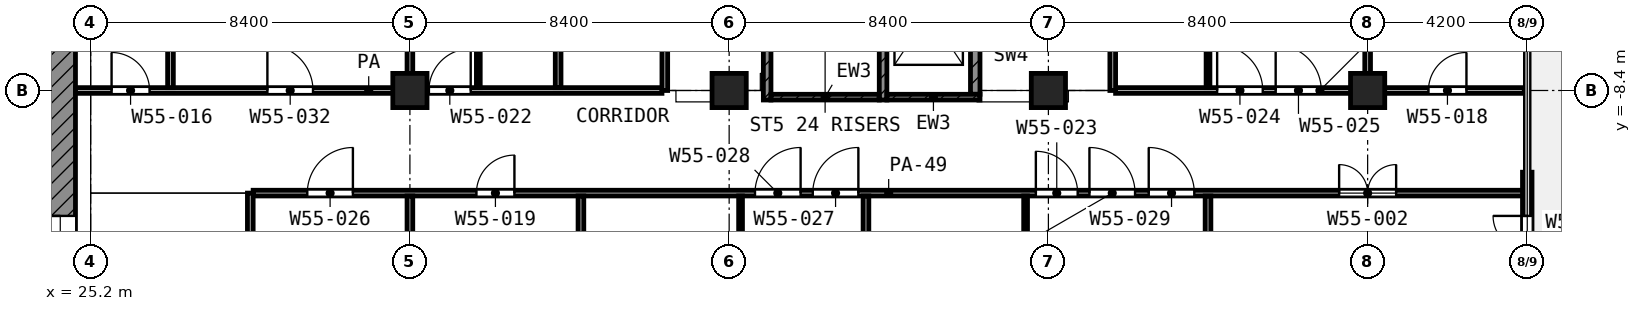
"""IFC4 building model, lengths in metres.
Left out: names, types, materials, properties, quantities, classifications, styles, units other than length and angle.
Written with IfcOpenShell. Run it as: python <this file> out.ifc"""

import sys

from ifc_helpers import new_model, si_unit, direction, frame, frame_2d, origin, origin_2d, place, context, subcontext, project, spatial, rectangle, extrude, element, fill, save


model = new_model("IFC4")
c1 = context("Model", 3, precision=1e-05, world=origin(), true_north=direction((0.0, 1.0)))
c2 = subcontext(c1, "Body", "Model", "MODEL_VIEW")
j1 = project(units=[si_unit("LENGTHUNIT", "METRE"), si_unit("PLANEANGLEUNIT", "RADIAN")], contexts=[c1])
p1 = place(None, origin())
s1 = spatial("IfcSite", under=j1, at=p1, CompositionType="ELEMENT")
p2 = place(p1, origin())
s2 = spatial("IfcBuilding", under=s1, at=p2, CompositionType="ELEMENT")
p3 = place(p2, frame((0.0, 0.0, 260.0)))
s3 = spatial("IfcBuildingStorey", under=s2, at=p3, CompositionType="ELEMENT", Elevation=260.0)
for number, where, z_axis, x_axis in (
    (1, (33.6, -8.4, 0.0), (0.0, 0.0, 1.0), (1.0, 0.0, 0.0)),
    (2, (42.0, -8.4, 0.0), (0.0, 0.0, 1.0), (1.0, 0.0, 0.0)),
    (3, (50.4, -8.4, 0.0), (0.0, 0.0, 1.0), (1.0, 0.0, 0.0)),
    (4, (58.8, -8.4, 0.0), (0.0, 0.0, 1.0), (1.0, 0.0, 0.0)),
):
    element("IfcColumn", number, at=place(p3, frame(where, z_axis=z_axis, x_axis=x_axis)), inside=s3, PredefinedType="COLUMN", context=c2, shape_type="SweptSolid", body=[
        extrude(rectangle(XDim=0.9, YDim=0.9, at=origin_2d()), origin(), (0.0, 0.0, 1.0), 4.2),
    ])
p4 = place(p3, frame((63.0, -14.65, 0.0), z_axis=(0.0, 0.0, 1.0), x_axis=(0.0, 1.0, 0.0)))
e5 = element("IfcWall", 5, at=p4, inside=s3, PredefinedType="SOLIDWALL", context=c2, shape_type="SweptSolid", body=[
    extrude(rectangle(XDim=4.1, YDim=0.25, at=frame_2d((2.05, 0.0))), origin(), (0.0, 0.0, 1.0), 2.58),
])
p5 = place(p4, frame((1.15, 0.0, 0.0)))
e6 = element("IfcOpeningElement", 6, at=p5, cuts=e5, PredefinedType="OPENING", context=c2, shape_type="SweptSolid", body=[
    extrude(rectangle(XDim=1.8, YDim=2.1, at=frame_2d((0.9, 1.05))), frame((0.0, 0.135, 0.0), z_axis=(0.0, -1.0, 0.0), x_axis=(1.0, 0.0, 0.0)), (0.0, 0.0, 1.0), 0.27),
])
p6 = place(p3, frame((24.4, -24.0, 0.0), z_axis=(0.0, 0.0, 1.0), x_axis=(0.0, 1.0, 0.0)))
e7 = element("IfcWall", 7, at=p6, inside=s3, PredefinedType="SHEAR", context=c2, shape_type="SweptSolid", body=[
    extrude(rectangle(XDim=18.6, YDim=0.8, at=frame_2d((9.3, 0.0))), origin(), (0.0, 0.0, 1.0), 3.6),
])
p7 = place(p6, frame((10.5, 0.0, 0.0)))
e8 = element("IfcOpeningElement", 8, at=p7, cuts=e7, PredefinedType="OPENING", context=c2, shape_type="SweptSolid", body=[
    extrude(rectangle(XDim=1.8, YDim=2.1, at=frame_2d((0.9, 1.05))), frame((0.0, 0.41, 0.0), z_axis=(0.0, -1.0, 0.0), x_axis=(1.0, 0.0, 0.0)), (0.0, 0.0, 1.0), 0.82),
])
p8 = place(p3, frame((43.0, -8.65, 0.0), z_axis=(0.0, 0.0, 1.0), x_axis=(0.0, 1.0, 0.0)))
e9 = element("IfcWall", 9, at=p8, inside=s3, PredefinedType="SHEAR", context=c2, shape_type="SweptSolid", body=[
    extrude(rectangle(XDim=8.35, YDim=0.2, at=frame_2d((4.175, 0.0))), origin(), (0.0, 0.0, 1.0), 3.6),
])
p9 = place(p8, frame((7.0, 0.0, 0.0)))
e10 = element("IfcOpeningElement", 10, at=p9, cuts=e9, PredefinedType="OPENING", context=c2, shape_type="SweptSolid", body=[
    extrude(rectangle(XDim=1.1, YDim=2.1, at=frame_2d((0.55, 1.05))), frame((0.0, 0.11, 0.0), z_axis=(0.0, -1.0, 0.0), x_axis=(1.0, 0.0, 0.0)), (0.0, 0.0, 1.0), 0.22),
])
p10 = place(p3, frame((46.05, -8.65, 0.0), z_axis=(0.0, 0.0, 1.0), x_axis=(0.0, 1.0, 0.0)))
e11 = element("IfcWall", 11, at=p10, inside=s3, PredefinedType="SHEAR", context=c2, shape_type="SweptSolid", body=[
    extrude(rectangle(XDim=8.35, YDim=0.2, at=frame_2d((4.175, 0.0))), origin(), (0.0, 0.0, 1.0), 3.6),
])
p11 = place(p10, frame((7.0, 0.0, 0.0)))
e12 = element("IfcOpeningElement", 12, at=p11, cuts=e11, PredefinedType="OPENING", context=c2, shape_type="SweptSolid", body=[
    extrude(rectangle(XDim=1.1, YDim=2.1, at=frame_2d((0.55, 1.05))), frame((0.0, 0.11, 0.0), z_axis=(0.0, -1.0, 0.0), x_axis=(1.0, 0.0, 0.0)), (0.0, 0.0, 1.0), 0.22),
])
p12 = place(p3, frame((43.1, -8.575, 0.0), z_axis=(0.0, 0.0, 1.0), x_axis=(1.0, 0.0, 0.0)))
e13 = element("IfcWall", 13, at=p12, inside=s3, PredefinedType="SHEAR", context=c2, shape_type="SweptSolid", body=[
    extrude(rectangle(XDim=2.85, YDim=0.15, at=frame_2d((1.425, 0.0))), origin(), (0.0, 0.0, 1.0), 3.6),
])
p13 = place(p3, frame((46.15, -8.575, 0.0), z_axis=(0.0, 0.0, 1.0), x_axis=(1.0, 0.0, 0.0)))
e14 = element("IfcWall", 14, at=p13, inside=s3, PredefinedType="SHEAR", context=c2, shape_type="SweptSolid", body=[
    extrude(rectangle(XDim=2.45, YDim=0.15, at=frame_2d((1.225, 0.0))), origin(), (0.0, 0.0, 1.0), 3.6),
])
p14 = place(p3, frame((48.475, -8.5, 0.0), z_axis=(0.0, 0.0, 1.0), x_axis=(0.0, 1.0, 0.0)))
e15 = element("IfcWall", 15, at=p14, inside=s3, PredefinedType="SHEAR", context=c2, shape_type="SweptSolid", body=[
    extrude(rectangle(XDim=3.475, YDim=0.25, at=frame_2d((1.738, 0.0))), origin(), (0.0, 0.0, 1.0), 3.6),
])
p15 = place(p3, frame((35.4, -8.325, 0.0), z_axis=(0.0, 0.0, 1.0), x_axis=(0.0, 1.0, 0.0)))
e16 = element("IfcWall", 16, at=p15, inside=s3, PredefinedType="PARTITIONING", context=c2, shape_type="SweptSolid", body=[
    extrude(rectangle(XDim=3.225, YDim=0.1, at=frame_2d((1.612, 0.0))), origin(), (0.0, 0.0, 1.0), 3.6),
])
p16 = place(p3, frame((42.3, -19.75, 0.0), z_axis=(0.0, 0.0, 1.0), x_axis=(0.0, 1.0, 0.0)))
e17 = element("IfcWall", 17, at=p16, inside=s3, PredefinedType="PARTITIONING", context=c2, shape_type="SweptSolid", body=[
    extrude(rectangle(XDim=8.575, YDim=0.1, at=frame_2d((4.288, 0.0))), origin(), (0.0, 0.0, 1.0), 3.6),
])
p17 = place(p16, frame((3.8, 0.0, 0.0)))
e18 = element("IfcOpeningElement", 18, at=p17, cuts=e17, PredefinedType="OPENING", context=c2, shape_type="SweptSolid", body=[
    extrude(rectangle(XDim=1.0, YDim=2.1, at=frame_2d((0.5, 1.05))), frame((0.0, 0.06, 0.0), z_axis=(0.0, -1.0, 0.0), x_axis=(1.0, 0.0, 0.0)), (0.0, 0.0, 1.0), 0.12),
])
p18 = place(p3, frame((49.8, -20.35, 0.0), z_axis=(0.0, 0.0, 1.0), x_axis=(0.0, 1.0, 0.0)))
e19 = element("IfcWall", 19, at=p18, inside=s3, PredefinedType="PARTITIONING", context=c2, shape_type="SweptSolid", body=[
    extrude(rectangle(XDim=9.175, YDim=0.1, at=frame_2d((4.587, 0.0))), origin(), (0.0, 0.0, 1.0), 3.6),
])
p19 = place(p18, frame((4.1, 0.0, 0.0)))
e20 = element("IfcOpeningElement", 20, at=p19, cuts=e19, PredefinedType="OPENING", context=c2, shape_type="SweptSolid", body=[
    extrude(rectangle(XDim=1.0, YDim=2.1, at=frame_2d((0.5, 1.05))), frame((0.0, 0.06, 0.0), z_axis=(0.0, -1.0, 0.0), x_axis=(1.0, 0.0, 0.0)), (0.0, 0.0, 1.0), 0.12),
])
p20 = place(p3, frame((54.6, -8.325, 0.0), z_axis=(0.0, 0.0, 1.0), x_axis=(0.0, 1.0, 0.0)))
e21 = element("IfcWall", 21, at=p20, inside=s3, PredefinedType="PARTITIONING", context=c2, shape_type="SweptSolid", body=[
    extrude(rectangle(XDim=3.475, YDim=0.1, at=frame_2d((1.737, 0.0))), origin(), (0.0, 0.0, 1.0), 3.6),
])
p21 = place(p20, frame((1.225, 0.0, 0.0)))
e22 = element("IfcOpeningElement", 22, at=p21, cuts=e21, PredefinedType="OPENING", context=c2, shape_type="SweptSolid", body=[
    extrude(rectangle(XDim=1.0, YDim=2.1, at=frame_2d((0.5, 1.05))), frame((0.0, 0.06, 0.0), z_axis=(0.0, -1.0, 0.0), x_axis=(1.0, 0.0, 0.0)), (0.0, 0.0, 1.0), 0.12),
])
p22 = place(p3, frame((29.475, -11.1, 0.0), z_axis=(0.0, 0.0, 1.0), x_axis=(1.0, 0.0, 0.0)))
e23 = element("IfcWall", 23, at=p22, inside=s3, PredefinedType="PARTITIONING", context=c2, shape_type="SweptSolid", body=[
    extrude(rectangle(XDim=33.445, YDim=0.15, at=frame_2d((16.722, 0.0))), origin(), (0.0, 0.0, 1.0), 2.7),
])
p23 = place(p22, frame((1.425, 0.0, 0.0)))
e24 = element("IfcOpeningElement", 24, at=p23, cuts=e23, PredefinedType="OPENING", context=c2, shape_type="SweptSolid", body=[
    extrude(rectangle(XDim=1.2, YDim=2.1, at=frame_2d((0.6, 1.05))), frame((0.0, 0.085, 0.0), z_axis=(0.0, -1.0, 0.0), x_axis=(1.0, 0.0, 0.0)), (0.0, 0.0, 1.0), 0.17),
])
p24 = place(p22, frame((5.875, 0.0, 0.0)))
e25 = element("IfcOpeningElement", 25, at=p24, cuts=e23, PredefinedType="OPENING", context=c2, shape_type="SweptSolid", body=[
    extrude(rectangle(XDim=1.0, YDim=2.1, at=frame_2d((0.5, 1.05))), frame((0.0, 0.085, 0.0), z_axis=(0.0, -1.0, 0.0), x_axis=(1.0, 0.0, 0.0)), (0.0, 0.0, 1.0), 0.17),
])
p25 = place(p22, frame((14.725, 0.0, 0.0)))
e26 = element("IfcOpeningElement", 26, at=p25, cuts=e23, PredefinedType="OPENING", context=c2, shape_type="SweptSolid", body=[
    extrude(rectangle(XDim=1.2, YDim=2.1, at=frame_2d((0.6, 1.05))), frame((0.0, 0.085, 0.0), z_axis=(0.0, -1.0, 0.0), x_axis=(1.0, 0.0, 0.0)), (0.0, 0.0, 1.0), 0.17),
])
p26 = place(p22, frame((13.205, 0.0, 0.0)))
e27 = element("IfcOpeningElement", 27, at=p26, cuts=e23, PredefinedType="OPENING", context=c2, shape_type="SweptSolid", body=[
    extrude(rectangle(XDim=1.2, YDim=2.1, at=frame_2d((0.6, 1.05))), frame((0.0, 0.085, 0.0), z_axis=(0.0, -1.0, 0.0), x_axis=(1.0, 0.0, 0.0)), (0.0, 0.0, 1.0), 0.17),
])
p27 = place(p22, frame((23.565, 0.0, 0.0)))
e28 = element("IfcOpeningElement", 28, at=p27, cuts=e23, PredefinedType="OPENING", context=c2, shape_type="SweptSolid", body=[
    extrude(rectangle(XDim=1.2, YDim=2.1, at=frame_2d((0.6, 1.05))), frame((0.0, 0.085, 0.0), z_axis=(0.0, -1.0, 0.0), x_axis=(1.0, 0.0, 0.0)), (0.0, 0.0, 1.0), 0.17),
])
p28 = place(p22, frame((22.005, 0.0, 0.0)))
e29 = element("IfcOpeningElement", 29, at=p28, cuts=e23, PredefinedType="OPENING", context=c2, shape_type="SweptSolid", body=[
    extrude(rectangle(XDim=1.2, YDim=2.1, at=frame_2d((0.6, 1.05))), frame((0.0, 0.085, 0.0), z_axis=(0.0, -1.0, 0.0), x_axis=(1.0, 0.0, 0.0)), (0.0, 0.0, 1.0), 0.17),
])
p29 = place(p22, frame((20.595, 0.0, 0.0)))
e30 = element("IfcOpeningElement", 30, at=p29, cuts=e23, PredefinedType="OPENING", context=c2, shape_type="SweptSolid", body=[
    extrude(rectangle(XDim=1.1, YDim=2.1, at=frame_2d((0.55, 1.05))), frame((0.0, 0.085, 0.0), z_axis=(0.0, -1.0, 0.0), x_axis=(1.0, 0.0, 0.0)), (0.0, 0.0, 1.0), 0.17),
])
p30 = place(p22, frame((28.575, 0.0, 0.0)))
e31 = element("IfcOpeningElement", 31, at=p30, cuts=e23, PredefinedType="OPENING", context=c2, shape_type="SweptSolid", body=[
    extrude(rectangle(XDim=1.5, YDim=2.1, at=frame_2d((0.75, 1.05))), frame((0.0, 0.085, 0.0), z_axis=(0.0, -1.0, 0.0), x_axis=(1.0, 0.0, 0.0)), (0.0, 0.0, 1.0), 0.17),
])
p31 = place(p3, frame((24.8, -8.4, 0.0), z_axis=(0.0, 0.0, 1.0), x_axis=(1.0, 0.0, 0.0)))
e32 = element("IfcWall", 32, at=p31, inside=s3, PredefinedType="PARTITIONING", context=c2, shape_type="SweptSolid", body=[
    extrude(rectangle(XDim=15.432, YDim=0.15, at=frame_2d((7.716, 0.0))), origin(), (0.0, 0.0, 1.0), 3.6),
])
p32 = place(p31, frame((9.3, 0.0, 0.0)))
e33 = element("IfcOpeningElement", 33, at=p32, cuts=e32, PredefinedType="OPENING", context=c2, shape_type="SweptSolid", body=[
    extrude(rectangle(XDim=1.1, YDim=2.1, at=frame_2d((0.55, 1.05))), frame((0.0, 0.085, 0.0), z_axis=(0.0, -1.0, 0.0), x_axis=(1.0, 0.0, 0.0)), (0.0, 0.0, 1.0), 0.17),
])
p33 = place(p31, frame((0.95, 0.0, 0.0)))
e34 = element("IfcOpeningElement", 34, at=p33, cuts=e32, PredefinedType="OPENING", context=c2, shape_type="SweptSolid", body=[
    extrude(rectangle(XDim=1.0, YDim=2.1, at=frame_2d((0.5, 1.05))), frame((0.0, 0.085, 0.0), z_axis=(0.0, -1.0, 0.0), x_axis=(1.0, 0.0, 0.0)), (0.0, 0.0, 1.0), 0.17),
])
p34 = place(p31, frame((5.05, 0.0, 0.0)))
e35 = element("IfcOpeningElement", 35, at=p34, cuts=e32, PredefinedType="OPENING", context=c2, shape_type="SweptSolid", body=[
    extrude(rectangle(XDim=1.2, YDim=2.1, at=frame_2d((0.6, 1.05))), frame((0.0, 0.085, 0.0), z_axis=(0.0, -1.0, 0.0), x_axis=(1.0, 0.0, 0.0)), (0.0, 0.0, 1.0), 0.17),
])
p35 = place(p3, frame((52.168, -8.4, 0.0), z_axis=(0.0, 0.0, 1.0), x_axis=(1.0, 0.0, 0.0)))
e36 = element("IfcWall", 36, at=p35, inside=s3, PredefinedType="PARTITIONING", context=c2, shape_type="SweptSolid", body=[
    extrude(rectangle(XDim=10.752, YDim=0.15, at=frame_2d((5.376, 0.0))), origin(), (0.0, 0.0, 1.0), 2.7),
])
p36 = place(p35, frame((2.672, 0.0, 0.0)))
e37 = element("IfcOpeningElement", 37, at=p36, cuts=e36, PredefinedType="OPENING", context=c2, shape_type="SweptSolid", body=[
    extrude(rectangle(XDim=1.2, YDim=2.1, at=frame_2d((0.6, 1.05))), frame((0.0, 0.085, 0.0), z_axis=(0.0, -1.0, 0.0), x_axis=(1.0, 0.0, 0.0)), (0.0, 0.0, 1.0), 0.17),
])
p37 = place(p35, frame((4.212, 0.0, 0.0)))
e38 = element("IfcOpeningElement", 38, at=p37, cuts=e36, PredefinedType="OPENING", context=c2, shape_type="SweptSolid", body=[
    extrude(rectangle(XDim=1.2, YDim=2.1, at=frame_2d((0.6, 1.05))), frame((0.0, 0.085, 0.0), z_axis=(0.0, -1.0, 0.0), x_axis=(1.0, 0.0, 0.0)), (0.0, 0.0, 1.0), 0.17),
])
p38 = place(p35, frame((8.232, 0.0, 0.0)))
e39 = element("IfcOpeningElement", 39, at=p38, cuts=e36, PredefinedType="OPENING", context=c2, shape_type="SweptSolid", body=[
    extrude(rectangle(XDim=1.0, YDim=2.1, at=frame_2d((0.5, 1.05))), frame((0.0, 0.085, 0.0), z_axis=(0.0, -1.0, 0.0), x_axis=(1.0, 0.0, 0.0)), (0.0, 0.0, 1.0), 0.17),
])
p39 = place(p3, frame((27.3, -8.325, 0.0), z_axis=(0.0, 0.0, 1.0), x_axis=(0.0, 1.0, 0.0)))
e40 = element("IfcWall", 40, at=p39, inside=s3, PredefinedType="PARTITIONING", context=c2, shape_type="SweptSolid", body=[
    extrude(rectangle(XDim=8.245, YDim=0.15, at=frame_2d((4.123, 0.0))), origin(), (0.0, 0.0, 1.0), 3.6),
])
p40 = place(p3, frame((29.4, -25.2, 0.0), z_axis=(0.0, 0.0, 1.0), x_axis=(0.0, 1.0, 0.0)))
e41 = element("IfcWall", 41, at=p40, inside=s3, PredefinedType="PARTITIONING", context=c2, shape_type="SweptSolid", body=[
    extrude(rectangle(XDim=14.1, YDim=0.15, at=frame_2d((7.05, 0.0))), origin(), (0.0, 0.0, 1.0), 3.6),
])
p41 = place(p3, frame((33.6, -25.12, 0.0), z_axis=(0.0, 0.0, 1.0), x_axis=(0.0, 1.0, 0.0)))
e42 = element("IfcWall", 42, at=p41, inside=s3, PredefinedType="PARTITIONING", context=c2, shape_type="SweptSolid", body=[
    extrude(rectangle(XDim=13.945, YDim=0.15, at=frame_2d((6.973, 0.0))), origin(), (0.0, 0.0, 1.0), 3.6),
])
for number, where, z_axis, x_axis in (
    (43, (33.6, -8.325, 0.0), (0.0, 0.0, 1.0), (0.0, 1.0, 0.0)),
    (44, (37.5, -8.325, 0.0), (0.0, 0.0, 1.0), (0.0, 1.0, 0.0)),
):
    element("IfcWall", number, at=place(p3, frame(where, z_axis=z_axis, x_axis=x_axis)), inside=s3, PredefinedType="PARTITIONING", context=c2, shape_type="SweptSolid", body=[
        extrude(rectangle(XDim=8.245, YDim=0.15, at=frame_2d((4.123, 0.0))), origin(), (0.0, 0.0, 1.0), 3.6),
    ])
p42 = place(p3, frame((38.1, -25.12, 0.0), z_axis=(0.0, 0.0, 1.0), x_axis=(0.0, 1.0, 0.0)))
e45 = element("IfcWall", 45, at=p42, inside=s3, PredefinedType="PARTITIONING", context=c2, shape_type="SweptSolid", body=[
    extrude(rectangle(XDim=13.945, YDim=0.15, at=frame_2d((6.973, 0.0))), origin(), (0.0, 0.0, 1.0), 3.6),
])
p43 = place(p3, frame((40.307, -8.4, 0.0), z_axis=(0.0, 0.0, 1.0), x_axis=(0.0, 1.0, 0.0)))
e46 = element("IfcWall", 46, at=p43, inside=s3, PredefinedType="PARTITIONING", context=c2, shape_type="SweptSolid", body=[
    extrude(rectangle(XDim=8.048, YDim=0.15, at=frame_2d((4.024, 0.0))), origin(), (0.0, 0.0, 1.0), 3.6),
])
p44 = place(p43, frame((3.524, 0.0, 0.0)))
e47 = element("IfcOpeningElement", 47, at=p44, cuts=e46, PredefinedType="OPENING", context=c2, shape_type="SweptSolid", body=[
    extrude(rectangle(XDim=1.0, YDim=2.1, at=frame_2d((0.5, 1.05))), frame((0.0, 0.085, 0.0), z_axis=(0.0, -1.0, 0.0), x_axis=(1.0, 0.0, 0.0)), (0.0, 0.0, 1.0), 0.17),
])
p45 = place(p3, frame((45.6, -25.12, 0.0), z_axis=(0.0, 0.0, 1.0), x_axis=(0.0, 1.0, 0.0)))
e48 = element("IfcWall", 48, at=p45, inside=s3, PredefinedType="PARTITIONING", context=c2, shape_type="SweptSolid", body=[
    extrude(rectangle(XDim=13.945, YDim=0.15, at=frame_2d((6.973, 0.0))), origin(), (0.0, 0.0, 1.0), 3.6),
])
p46 = place(p3, frame((52.093, -8.4, 0.0), z_axis=(0.0, 0.0, 1.0), x_axis=(0.0, 1.0, 0.0)))
e49 = element("IfcWall", 49, at=p46, inside=s3, PredefinedType="PARTITIONING", context=c2, shape_type="SweptSolid", body=[
    extrude(rectangle(XDim=6.55, YDim=0.15, at=frame_2d((3.275, 0.0))), origin(), (0.0, 0.0, 1.0), 3.6),
])
p47 = place(p3, frame((54.6, -25.12, 0.0), z_axis=(0.0, 0.0, 1.0), x_axis=(0.0, 1.0, 0.0)))
e50 = element("IfcWall", 50, at=p47, inside=s3, PredefinedType="PARTITIONING", context=c2, shape_type="SweptSolid", body=[
    extrude(rectangle(XDim=13.945, YDim=0.15, at=frame_2d((6.973, 0.0))), origin(), (0.0, 0.0, 1.0), 3.6),
])
p48 = place(p3, frame((58.8, -8.325, 0.0), z_axis=(0.0, 0.0, 1.0), x_axis=(0.0, 1.0, 0.0)))
e51 = element("IfcWall", 51, at=p48, inside=s3, PredefinedType="PARTITIONING", context=c2, shape_type="SweptSolid", body=[
    extrude(rectangle(XDim=6.412, YDim=0.15, at=frame_2d((3.206, 0.0))), origin(), (0.0, 0.0, 1.0), 2.7),
])
p49 = place(p5, origin())
e52 = element("IfcDoor", 52, at=p49, inside=s3, OperationType="DOUBLE_DOOR_SINGLE_SWING", PredefinedType="DOOR", context=c2, shape_type="SweptSolid", body=[
    extrude(rectangle(XDim=1.8, YDim=2.1, at=frame_2d((0.9, 1.05))), frame((0.0, 0.025, 0.0), z_axis=(0.0, -1.0, 0.0), x_axis=(1.0, 0.0, 0.0)), (0.0, 0.0, 1.0), 0.05),
])
fill(e6, e52)
p50 = place(p7, origin())
e53 = element("IfcDoor", 53, at=p50, inside=s3, OperationType="DOUBLE_DOOR_SINGLE_SWING", PredefinedType="DOOR", context=c2, shape_type="SweptSolid", body=[
    extrude(rectangle(XDim=1.8, YDim=2.1, at=frame_2d((0.9, 1.05))), frame((0.0, 0.025, 0.0), z_axis=(0.0, -1.0, 0.0), x_axis=(1.0, 0.0, 0.0)), (0.0, 0.0, 1.0), 0.05),
])
fill(e8, e53)
p51 = place(p32, origin())
e54 = element("IfcDoor", 54, at=p51, inside=s3, OperationType="SINGLE_SWING_RIGHT", PredefinedType="DOOR", context=c2, shape_type="SweptSolid", body=[
    extrude(rectangle(XDim=1.1, YDim=2.1, at=frame_2d((0.55, 1.05))), frame((0.0, 0.025, 0.0), z_axis=(0.0, -1.0, 0.0), x_axis=(1.0, 0.0, 0.0)), (0.0, 0.0, 1.0), 0.05),
])
fill(e33, e54)
p52 = place(p36, origin())
e55 = element("IfcDoor", 55, at=p52, inside=s3, OperationType="SINGLE_SWING_LEFT", PredefinedType="DOOR", context=c2, shape_type="SweptSolid", body=[
    extrude(rectangle(XDim=1.2, YDim=2.1, at=frame_2d((0.6, 1.05))), frame((0.0, 0.025, 0.0), z_axis=(0.0, -1.0, 0.0), x_axis=(1.0, 0.0, 0.0)), (0.0, 0.0, 1.0), 0.05),
])
fill(e37, e55)
p53 = place(p37, origin())
e56 = element("IfcDoor", 56, at=p53, inside=s3, OperationType="SINGLE_SWING_LEFT", PredefinedType="DOOR", context=c2, shape_type="SweptSolid", body=[
    extrude(rectangle(XDim=1.2, YDim=2.1, at=frame_2d((0.6, 1.05))), frame((0.0, 0.025, 0.0), z_axis=(0.0, -1.0, 0.0), x_axis=(1.0, 0.0, 0.0)), (0.0, 0.0, 1.0), 0.05),
])
fill(e38, e56)
p54 = place(p38, origin())
e57 = element("IfcDoor", 57, at=p54, inside=s3, OperationType="SINGLE_SWING_RIGHT", PredefinedType="DOOR", context=c2, shape_type="SweptSolid", body=[
    extrude(rectangle(XDim=1.0, YDim=2.1, at=frame_2d((0.5, 1.05))), frame((0.0, 0.025, 0.0), z_axis=(0.0, -1.0, 0.0), x_axis=(1.0, 0.0, 0.0)), (0.0, 0.0, 1.0), 0.05),
])
fill(e39, e57)
p55 = place(p23, origin())
e58 = element("IfcDoor", 58, at=p55, inside=s3, OperationType="SINGLE_SWING_RIGHT", PredefinedType="DOOR", context=c2, shape_type="SweptSolid", body=[
    extrude(rectangle(XDim=1.2, YDim=2.1, at=frame_2d((0.6, 1.05))), frame((0.0, 0.025, 0.0), z_axis=(0.0, -1.0, 0.0), x_axis=(1.0, 0.0, 0.0)), (0.0, 0.0, 1.0), 0.05),
])
fill(e24, e58)
p56 = place(p24, origin())
e59 = element("IfcDoor", 59, at=p56, inside=s3, OperationType="SINGLE_SWING_RIGHT", PredefinedType="DOOR", context=c2, shape_type="SweptSolid", body=[
    extrude(rectangle(XDim=1.0, YDim=2.1, at=frame_2d((0.5, 1.05))), frame((0.0, 0.025, 0.0), z_axis=(0.0, -1.0, 0.0), x_axis=(1.0, 0.0, 0.0)), (0.0, 0.0, 1.0), 0.05),
])
fill(e25, e59)
p57 = place(p25, origin())
e60 = element("IfcDoor", 60, at=p57, inside=s3, OperationType="SINGLE_SWING_RIGHT", PredefinedType="DOOR", context=c2, shape_type="SweptSolid", body=[
    extrude(rectangle(XDim=1.2, YDim=2.1, at=frame_2d((0.6, 1.05))), frame((0.0, 0.025, 0.0), z_axis=(0.0, -1.0, 0.0), x_axis=(1.0, 0.0, 0.0)), (0.0, 0.0, 1.0), 0.05),
])
fill(e26, e60)
p58 = place(p26, origin())
e61 = element("IfcDoor", 61, at=p58, inside=s3, OperationType="SINGLE_SWING_RIGHT", PredefinedType="DOOR", context=c2, shape_type="SweptSolid", body=[
    extrude(rectangle(XDim=1.2, YDim=2.1, at=frame_2d((0.6, 1.05))), frame((0.0, 0.025, 0.0), z_axis=(0.0, -1.0, 0.0), x_axis=(1.0, 0.0, 0.0)), (0.0, 0.0, 1.0), 0.05),
])
fill(e27, e61)
p59 = place(p27, origin())
e62 = element("IfcDoor", 62, at=p59, inside=s3, OperationType="SINGLE_SWING_LEFT", PredefinedType="DOOR", context=c2, shape_type="SweptSolid", body=[
    extrude(rectangle(XDim=1.2, YDim=2.1, at=frame_2d((0.6, 1.05))), frame((0.0, 0.025, 0.0), z_axis=(0.0, -1.0, 0.0), x_axis=(1.0, 0.0, 0.0)), (0.0, 0.0, 1.0), 0.05),
])
fill(e28, e62)
p60 = place(p28, origin())
e63 = element("IfcDoor", 63, at=p60, inside=s3, OperationType="SINGLE_SWING_LEFT", PredefinedType="DOOR", context=c2, shape_type="SweptSolid", body=[
    extrude(rectangle(XDim=1.2, YDim=2.1, at=frame_2d((0.6, 1.05))), frame((0.0, 0.025, 0.0), z_axis=(0.0, -1.0, 0.0), x_axis=(1.0, 0.0, 0.0)), (0.0, 0.0, 1.0), 0.05),
])
fill(e29, e63)
p61 = place(p29, origin())
e64 = element("IfcDoor", 64, at=p61, inside=s3, OperationType="SINGLE_SWING_LEFT", PredefinedType="DOOR", context=c2, shape_type="SweptSolid", body=[
    extrude(rectangle(XDim=1.1, YDim=2.1, at=frame_2d((0.55, 1.05))), frame((0.0, 0.025, 0.0), z_axis=(0.0, -1.0, 0.0), x_axis=(1.0, 0.0, 0.0)), (0.0, 0.0, 1.0), 0.05),
])
fill(e30, e64)
p62 = place(p30, origin())
e65 = element("IfcDoor", 65, at=p62, inside=s3, OperationType="DOUBLE_DOOR_SINGLE_SWING", PredefinedType="DOOR", context=c2, shape_type="SweptSolid", body=[
    extrude(rectangle(XDim=1.5, YDim=2.1, at=frame_2d((0.75, 1.05))), frame((0.0, 0.025, 0.0), z_axis=(0.0, -1.0, 0.0), x_axis=(1.0, 0.0, 0.0)), (0.0, 0.0, 1.0), 0.05),
])
fill(e31, e65)
p63 = place(p33, origin())
e66 = element("IfcDoor", 66, at=p63, inside=s3, OperationType="SINGLE_SWING_LEFT", PredefinedType="DOOR", context=c2, shape_type="SweptSolid", body=[
    extrude(rectangle(XDim=1.0, YDim=2.1, at=frame_2d((0.5, 1.05))), frame((0.0, 0.025, 0.0), z_axis=(0.0, -1.0, 0.0), x_axis=(1.0, 0.0, 0.0)), (0.0, 0.0, 1.0), 0.05),
])
fill(e34, e66)
p64 = place(p34, origin())
e67 = element("IfcDoor", 67, at=p64, inside=s3, OperationType="SINGLE_SWING_LEFT", PredefinedType="DOOR", context=c2, shape_type="SweptSolid", body=[
    extrude(rectangle(XDim=1.2, YDim=2.1, at=frame_2d((0.6, 1.05))), frame((0.0, 0.025, 0.0), z_axis=(0.0, -1.0, 0.0), x_axis=(1.0, 0.0, 0.0)), (0.0, 0.0, 1.0), 0.05),
])
fill(e35, e67)
save(model, sys.argv[1])
